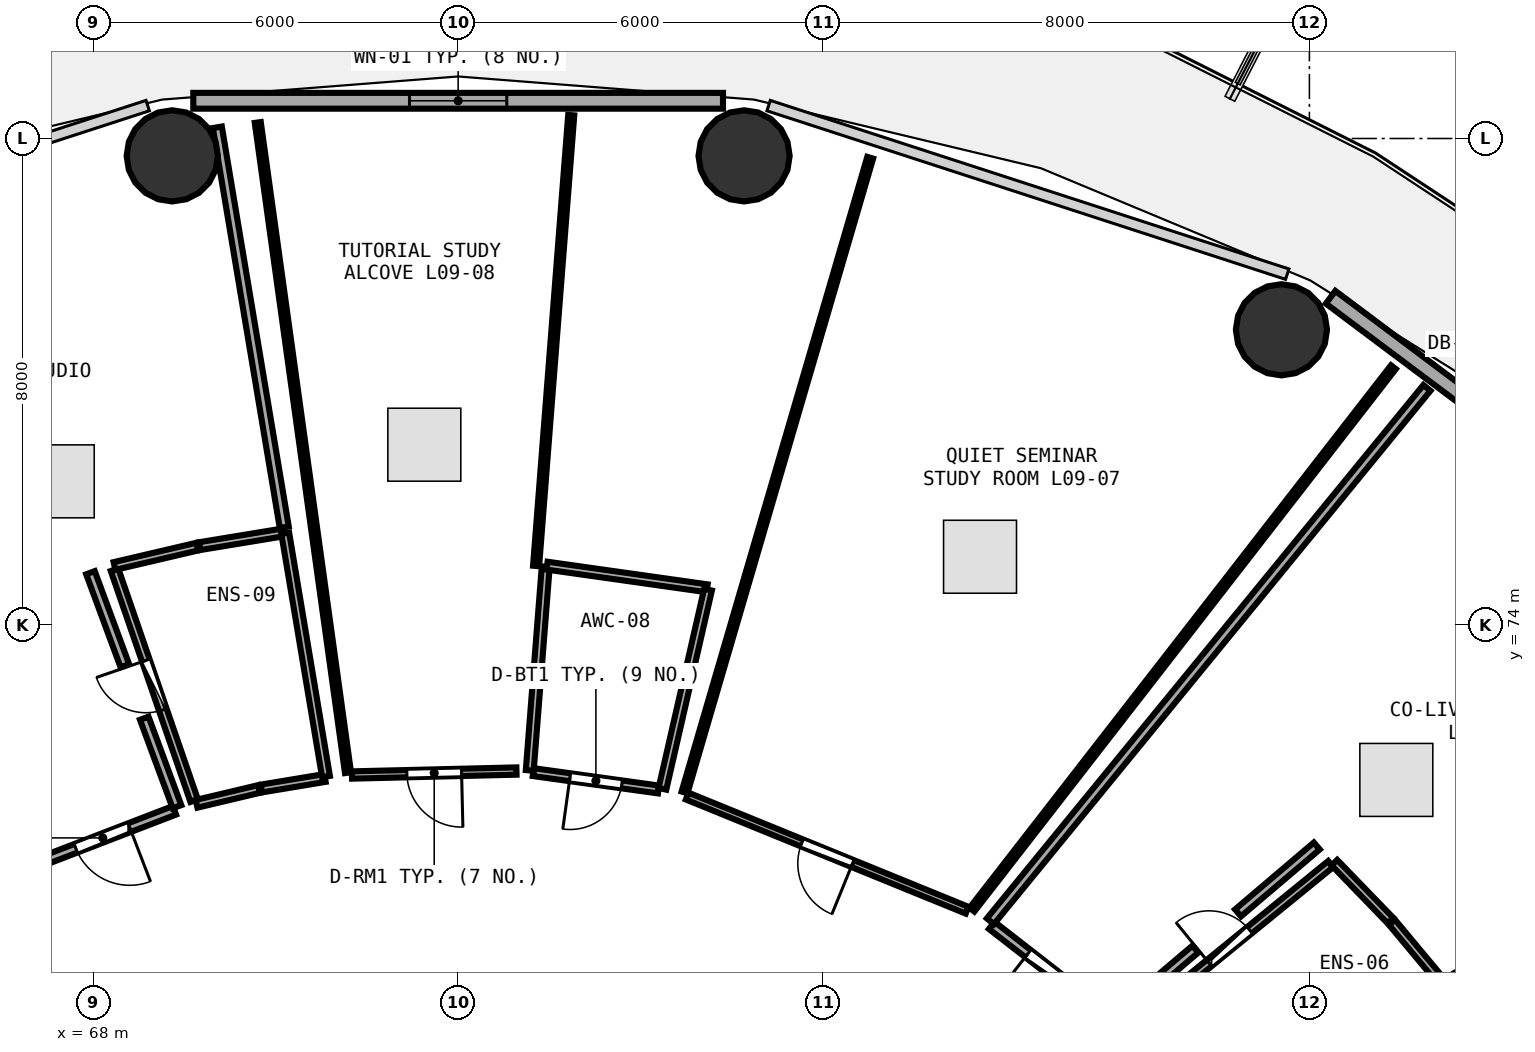
"""IFC4 building model, lengths in metres.
Left out: names, types, materials, properties, quantities, classifications, styles, units other than length and angle.
Written with IfcOpenShell. Run it as: python <this file> out.ifc"""

import sys

from ifc_helpers import new_model, si_unit, direction, frame, frame_2d, origin, origin_2d, place, context, subcontext, project, spatial, rectangle, circle, extrude, element, fill, save


model = new_model("IFC4")
c1 = context("Model", 3, precision=1e-05, world=origin(), true_north=direction((0.0, 1.0)))
c2 = subcontext(c1, "Body", "Model", "MODEL_VIEW")
j1 = project(units=[si_unit("LENGTHUNIT", "METRE"), si_unit("PLANEANGLEUNIT", "RADIAN")], contexts=[c1])
p1 = place(None, origin())
s1 = spatial("IfcSite", under=j1, at=p1, CompositionType="ELEMENT")
p2 = place(p1, origin())
s2 = spatial("IfcBuilding", under=s1, at=p2, CompositionType="ELEMENT")
p3 = place(p2, frame((0.0, 0.0, 37.5)))
s3 = spatial("IfcBuildingStorey", under=s2, at=p3, CompositionType="ELEMENT", Elevation=37.5)
for number, where, z_axis, x_axis in (
    (1, (87.54, 78.854, 0.0), (0.0, 0.0, 1.0), (1.0, 0.0, 0.0)),
    (2, (78.702, 81.714, 0.0), (0.0, 0.0, 1.0), (1.0, 0.0, 0.0)),
    (3, (69.298, 81.714, 0.0), (0.0, 0.0, 1.0), (1.0, 0.0, 0.0)),
):
    element("IfcColumn", number, at=place(p3, frame(where, z_axis=z_axis, x_axis=x_axis)), inside=s3, PredefinedType="COLUMN", context=c2, shape_type="SweptSolid", body=[
        extrude(circle(Radius=0.75, at=origin_2d()), origin(), (0.0, 0.0, 1.0), 3.75),
    ])
p4 = place(p3, frame((94.984, 74.418, 0.0), z_axis=(0.0, 0.0, 1.0), x_axis=(-0.80030733173, 0.599590005569, 0.0)))
e4 = element("IfcWall", 4, at=p4, inside=s3, PredefinedType="SOLIDWALL", context=c2, shape_type="SweptSolid", body=[
    extrude(rectangle(XDim=8.291, YDim=0.26, at=frame_2d((4.145, 0.0))), origin(), (0.0, 0.0, 1.0), 3.475),
])
p5 = place(p4, frame((3.67, 0.0, 0.0)))
e5 = element("IfcOpeningElement", 5, at=p5, cuts=e4, PredefinedType="OPENING", context=c2, shape_type="SweptSolid", body=[
    extrude(rectangle(XDim=0.95, YDim=2.1, at=frame_2d((0.475, 1.05))), frame((0.0, 0.14, 0.0), z_axis=(0.0, -1.0, 0.0), x_axis=(1.0, 0.0, 0.0)), (0.0, 0.0, 1.0), 0.28),
])
p6 = place(p4, frame((2.09, 0.0, 0.85)))
e6 = element("IfcOpeningElement", 6, at=p6, cuts=e4, PredefinedType="OPENING", context=c2, shape_type="SweptSolid", body=[
    extrude(rectangle(XDim=1.2, YDim=1.45, at=frame_2d((0.6, 0.725))), frame((0.0, 0.14, 0.0), z_axis=(0.0, -1.0, 0.0), x_axis=(1.0, 0.0, 0.0)), (0.0, 0.0, 1.0), 0.28),
])
p7 = place(p3, frame((78.356, 82.62, 0.0), z_axis=(0.0, 0.0, 1.0), x_axis=(-1.0, 0.0, 0.0)))
e7 = element("IfcWall", 7, at=p7, inside=s3, PredefinedType="SOLIDWALL", context=c2, shape_type="SweptSolid", body=[
    extrude(rectangle(XDim=8.712, YDim=0.26, at=frame_2d((4.356, 0.0))), origin(), (0.0, 0.0, 1.0), 3.475),
])
p8 = place(p7, frame((3.556, 0.0, 0.85)))
e8 = element("IfcOpeningElement", 8, at=p8, cuts=e7, PredefinedType="OPENING", context=c2, shape_type="SweptSolid", body=[
    extrude(rectangle(XDim=1.6, YDim=1.45, at=frame_2d((0.8, 0.725))), frame((0.0, 0.14, 0.0), z_axis=(0.0, -1.0, 0.0), x_axis=(1.0, 0.0, 0.0)), (0.0, 0.0, 1.0), 0.28),
])
p9 = place(p3, frame((85.019, 67.353, 0.0), z_axis=(0.0, 0.0, 1.0), x_axis=(0.775195837983, 0.631720992823, 0.0)))
e9 = element("IfcWall", 9, at=p9, inside=s3, PredefinedType="PLUMBINGWALL", context=c2, shape_type="SweptSolid", body=[
    extrude(rectangle(XDim=4.298, YDim=0.13, at=frame_2d((2.149, 0.0))), origin(), (0.0, 0.0, 1.0), 3.235),
])
p10 = place(p9, frame((1.719, 0.0, 0.0)))
e10 = element("IfcOpeningElement", 10, at=p10, cuts=e9, PredefinedType="OPENING", context=c2, shape_type="SweptSolid", body=[
    extrude(rectangle(XDim=0.86, YDim=2.05, at=frame_2d((0.43, 1.025))), frame((0.0, 0.075, 0.0), z_axis=(0.0, -1.0, 0.0), x_axis=(1.0, 0.0, 0.0)), (0.0, 0.0, 1.0), 0.15),
])
p11 = place(p3, frame((84.717, 67.55, 0.0), z_axis=(0.0, 0.0, 1.0), x_axis=(-0.78945378775, 0.613810000739, 0.0)))
e11 = element("IfcWall", 11, at=p11, inside=s3, PredefinedType="PARTITIONING", context=c2, shape_type="SweptSolid", body=[
    extrude(rectangle(XDim=2.459, YDim=0.15, at=frame_2d((1.229, 0.0))), origin(), (0.0, 0.0, 1.0), 2.875),
])
p12 = place(p11, frame((0.754, 0.0, 0.0)))
e12 = element("IfcOpeningElement", 12, at=p12, cuts=e11, PredefinedType="OPENING", context=c2, shape_type="SweptSolid", body=[
    extrude(rectangle(XDim=0.95, YDim=2.08, at=frame_2d((0.475, 1.04))), frame((0.0, 0.085, 0.0), z_axis=(0.0, -1.0, 0.0), x_axis=(1.0, 0.0, 0.0)), (0.0, 0.0, 1.0), 0.17),
])
p13 = place(p3, frame((82.37, 69.309, 0.0), z_axis=(0.0, 0.0, 1.0), x_axis=(-0.925986810505, 0.377555859139, 0.0)))
e13 = element("IfcWall", 13, at=p13, inside=s3, PredefinedType="PARTITIONING", context=c2, shape_type="SweptSolid", body=[
    extrude(rectangle(XDim=4.971, YDim=0.12, at=frame_2d((2.485, 0.0))), origin(), (0.0, 0.0, 1.0), 2.875),
])
p14 = place(p13, frame((2.035, 0.0, 0.0)))
e14 = element("IfcOpeningElement", 14, at=p14, cuts=e13, PredefinedType="OPENING", context=c2, shape_type="SweptSolid", body=[
    extrude(rectangle(XDim=0.9, YDim=2.08, at=frame_2d((0.45, 1.04))), frame((0.0, 0.07, 0.0), z_axis=(0.0, -1.0, 0.0), x_axis=(1.0, 0.0, 0.0)), (0.0, 0.0, 1.0), 0.14),
])
p15 = place(p3, frame((77.296, 71.294, 0.0), z_axis=(0.0, 0.0, 1.0), x_axis=(-0.990525563984, 0.137328464257, 0.0)))
e15 = element("IfcWall", 15, at=p15, inside=s3, PredefinedType="PLUMBINGWALL", context=c2, shape_type="SweptSolid", body=[
    extrude(rectangle(XDim=2.08, YDim=0.13, at=frame_2d((1.04, 0.0))), origin(), (0.0, 0.0, 1.0), 3.235),
])
p16 = place(p15, frame((0.61, 0.0, 0.0)))
e16 = element("IfcOpeningElement", 16, at=p16, cuts=e15, PredefinedType="OPENING", context=c2, shape_type="SweptSolid", body=[
    extrude(rectangle(XDim=0.86, YDim=2.05, at=frame_2d((0.43, 1.025))), frame((0.0, 0.075, 0.0), z_axis=(0.0, -1.0, 0.0), x_axis=(1.0, 0.0, 0.0)), (0.0, 0.0, 1.0), 0.15),
])
p17 = place(p3, frame((74.959, 71.598, 0.0), z_axis=(0.0, 0.0, 1.0), x_axis=(-0.999709782288, -0.024090479411, 0.0)))
e17 = element("IfcWall", 17, at=p17, inside=s3, PredefinedType="PARTITIONING", context=c2, shape_type="SweptSolid", body=[
    extrude(rectangle(XDim=2.706, YDim=0.12, at=frame_2d((1.353, 0.0))), origin(), (0.0, 0.0, 1.0), 3.48),
])
p18 = place(p17, frame((0.903, 0.0, 0.0)))
e18 = element("IfcOpeningElement", 18, at=p18, cuts=e17, PredefinedType="OPENING", context=c2, shape_type="SweptSolid", body=[
    extrude(rectangle(XDim=0.9, YDim=2.08, at=frame_2d((0.45, 1.04))), frame((0.0, 0.07, 0.0), z_axis=(0.0, -1.0, 0.0), x_axis=(1.0, 0.0, 0.0)), (0.0, 0.0, 1.0), 0.14),
])
p19 = place(p3, frame((69.658, 71.111, 0.0), z_axis=(0.0, 0.0, 1.0), x_axis=(-0.326056236537, 0.945350374525, 0.0)))
e19 = element("IfcWall", 19, at=p19, inside=s3, PredefinedType="PLUMBINGWALL", context=c2, shape_type="SweptSolid", body=[
    extrude(rectangle(XDim=4.017, YDim=0.13, at=frame_2d((2.009, 0.0))), origin(), (0.0, 0.0, 1.0), 3.175),
])
p20 = place(p19, frame((1.579, 0.0, 0.0)))
e20 = element("IfcOpeningElement", 20, at=p20, cuts=e19, PredefinedType="OPENING", context=c2, shape_type="SweptSolid", body=[
    extrude(rectangle(XDim=0.86, YDim=2.05, at=frame_2d((0.43, 1.025))), frame((0.0, 0.075, 0.0), z_axis=(0.0, -1.0, 0.0), x_axis=(1.0, 0.0, 0.0)), (0.0, 0.0, 1.0), 0.15),
])
p21 = place(p3, frame((69.334, 70.951, 0.0), z_axis=(0.0, 0.0, 1.0), x_axis=(-0.933283302704, -0.35914102647, 0.0)))
e21 = element("IfcWall", 21, at=p21, inside=s3, PredefinedType="PARTITIONING", context=c2, shape_type="SweptSolid", body=[
    extrude(rectangle(XDim=2.525, YDim=0.15, at=frame_2d((1.263, 0.0))), origin(), (0.0, 0.0, 1.0), 3.48),
])
p22 = place(p21, frame((0.788, 0.0, 0.0)))
e22 = element("IfcOpeningElement", 22, at=p22, cuts=e21, PredefinedType="OPENING", context=c2, shape_type="SweptSolid", body=[
    extrude(rectangle(XDim=0.95, YDim=2.08, at=frame_2d((0.475, 1.04))), frame((0.0, 0.085, 0.0), z_axis=(0.0, -1.0, 0.0), x_axis=(1.0, 0.0, 0.0)), (0.0, 0.0, 1.0), 0.17),
])
p23 = place(p3, frame((86.597, 65.503, 0.0), z_axis=(0.0, 0.0, 1.0), x_axis=(0.867860677455, 0.496807653451, 0.0)))
e23 = element("IfcWall", 23, at=p23, inside=s3, PredefinedType="PARTITIONING", context=c2, shape_type="SweptSolid", body=[
    extrude(rectangle(XDim=11.91, YDim=0.1, at=frame_2d((5.955, 0.0))), origin(), (0.0, 0.0, 1.0), 2.875),
])
p24 = place(p3, frame((88.411, 70.092, 0.0), z_axis=(0.0, 0.0, 1.0), x_axis=(0.695307837391, -0.718712050311, 0.0)))
e24 = element("IfcWall", 24, at=p24, inside=s3, PredefinedType="PLUMBINGWALL", context=c2, shape_type="SweptSolid", body=[
    extrude(rectangle(XDim=1.325, YDim=0.13, at=frame_2d((0.662, 0.0))), origin(), (0.0, 0.0, 1.0), 2.875),
])
p25 = place(p3, frame((89.359, 69.11, 0.0), z_axis=(0.0, 0.0, 1.0), x_axis=(0.640366952349, -0.7680691156, 0.0)))
e25 = element("IfcWall", 25, at=p25, inside=s3, PredefinedType="PLUMBINGWALL", context=c2, shape_type="SweptSolid", body=[
    extrude(rectangle(XDim=1.315, YDim=0.13, at=frame_2d((0.658, 0.0))), origin(), (0.0, 0.0, 1.0), 3.48),
])
p26 = place(p3, frame((82.753, 69.127, 0.0), z_axis=(0.0, 0.0, 1.0), x_axis=(0.633350378952, 0.773865167508, 0.0)))
e26 = element("IfcWall", 26, at=p26, inside=s3, PredefinedType="PARTITIONING", context=c2, shape_type="SweptSolid", body=[
    extrude(rectangle(XDim=11.335, YDim=0.15, at=frame_2d((5.667, 0.0))), origin(), (0.0, 0.0, 1.0), 2.875),
])
p27 = place(p3, frame((96.559, 71.915, 0.0), z_axis=(0.0, 0.0, 1.0), x_axis=(-0.856200610964, -0.516643507444, 0.0)))
e27 = element("IfcWall", 27, at=p27, inside=s3, PredefinedType="PARTITIONING", context=c2, shape_type="SweptSolid", body=[
    extrude(rectangle(XDim=7.333, YDim=0.15, at=frame_2d((3.667, 0.0))), origin(), (0.0, 0.0, 1.0), 2.875),
])
p28 = place(p3, frame((88.122, 70.365, 0.0), z_axis=(0.0, 0.0, 1.0), x_axis=(-0.762159009155, -0.647389870761, 0.0)))
e28 = element("IfcWall", 28, at=p28, inside=s3, PredefinedType="PARTITIONING", context=c2, shape_type="SweptSolid", body=[
    extrude(rectangle(XDim=1.7, YDim=0.15, at=frame_2d((0.85, 0.0))), origin(), (0.0, 0.0, 1.0), 3.48),
])
p29 = place(p3, frame((86.125, 68.669, 0.0), z_axis=(0.0, 0.0, 1.0), x_axis=(-0.762122187233, -0.647433217967, 0.0)))
e29 = element("IfcWall", 29, at=p29, inside=s3, PredefinedType="PARTITIONING", context=c2, shape_type="SweptSolid", body=[
    extrude(rectangle(XDim=1.746, YDim=0.15, at=frame_2d((0.873, 0.0))), origin(), (0.0, 0.0, 1.0), 3.235),
])
p30 = place(p3, frame((77.723, 71.246, 0.0), z_axis=(0.0, 0.0, 1.0), x_axis=(0.280805949977, 0.959764564077, 0.0)))
e30 = element("IfcWall", 30, at=p30, inside=s3, PredefinedType="PARTITIONING", context=c2, shape_type="SweptSolid", body=[
    extrude(rectangle(XDim=10.875, YDim=0.1, at=frame_2d((5.438, 0.0))), origin(), (0.0, 0.0, 1.0), 2.875),
])
p31 = place(p3, frame((89.382, 78.24, 0.0), z_axis=(0.0, 0.0, 1.0), x_axis=(-0.613494694267, -0.789698841398, 0.0)))
e31 = element("IfcWall", 31, at=p31, inside=s3, PredefinedType="PARTITIONING", context=c2, shape_type="SweptSolid", body=[
    extrude(rectangle(XDim=11.298, YDim=0.1, at=frame_2d((5.649, 0.0))), origin(), (0.0, 0.0, 1.0), 2.875),
])
p32 = place(p3, frame((75.177, 71.608, 0.0), z_axis=(0.0, 0.0, 1.0), x_axis=(0.078246463122, 0.996934045466, 0.0)))
e32 = element("IfcWall", 32, at=p32, inside=s3, PredefinedType="PLUMBINGWALL", context=c2, shape_type="SweptSolid", body=[
    extrude(rectangle(XDim=3.36, YDim=0.13, at=frame_2d((1.68, 0.0))), origin(), (0.0, 0.0, 1.0), 3.175),
])
p33 = place(p3, frame((75.462, 74.975, 0.0), z_axis=(0.0, 0.0, 1.0), x_axis=(0.990145060781, -0.140045559051, 0.0)))
e33 = element("IfcWall", 33, at=p33, inside=s3, PredefinedType="PLUMBINGWALL", context=c2, shape_type="SweptSolid", body=[
    extrude(rectangle(XDim=2.658, YDim=0.13, at=frame_2d((1.329, 0.0))), origin(), (0.0, 0.0, 1.0), 3.175),
])
p34 = place(p3, frame((78.11, 74.581, 0.0), z_axis=(0.0, 0.0, 1.0), x_axis=(-0.223219382096, -0.974768232688, 0.0)))
e34 = element("IfcWall", 34, at=p34, inside=s3, PredefinedType="PLUMBINGWALL", context=c2, shape_type="SweptSolid", body=[
    extrude(rectangle(XDim=3.36, YDim=0.13, at=frame_2d((1.68, 0.0))), origin(), (0.0, 0.0, 1.0), 3.235),
])
p35 = place(p3, frame((72.188, 71.571, 0.0), z_axis=(0.0, 0.0, 1.0), x_axis=(-0.137456200911, 0.990507845921, 0.0)))
e35 = element("IfcWall", 35, at=p35, inside=s3, PredefinedType="PARTITIONING", context=c2, shape_type="SweptSolid", body=[
    extrude(rectangle(XDim=10.795, YDim=0.1, at=frame_2d((5.398, 0.0))), origin(), (0.0, 0.0, 1.0), 2.875),
])
p36 = place(p3, frame((75.86, 82.384, 0.0), z_axis=(0.0, 0.0, 1.0), x_axis=(-0.077713284576, -0.996975749655, 0.0)))
e36 = element("IfcWall", 36, at=p36, inside=s3, PredefinedType="PARTITIONING", context=c2, shape_type="SweptSolid", body=[
    extrude(rectangle(XDim=7.436, YDim=0.1, at=frame_2d((3.718, 0.0))), origin(), (0.0, 0.0, 1.0), 2.875),
])
p37 = place(p3, frame((71.81, 71.484, 0.0), z_axis=(0.0, 0.0, 1.0), x_axis=(-0.986536732665, -0.163539827269, 0.0)))
e37 = element("IfcWall", 37, at=p37, inside=s3, PredefinedType="PLUMBINGWALL", context=c2, shape_type="SweptSolid", body=[
    extrude(rectangle(XDim=1.06, YDim=0.13, at=frame_2d((0.53, 0.0))), origin(), (0.0, 0.0, 1.0), 2.875),
])
p38 = place(p3, frame((70.726, 71.302, 0.0), z_axis=(0.0, 0.0, 1.0), x_axis=(-0.972994310962, -0.230829094431, 0.0)))
e38 = element("IfcWall", 38, at=p38, inside=s3, PredefinedType="PLUMBINGWALL", context=c2, shape_type="SweptSolid", body=[
    extrude(rectangle(XDim=1.057, YDim=0.13, at=frame_2d((0.528, 0.0))), origin(), (0.0, 0.0, 1.0), 2.875),
])
p39 = place(p3, frame((68.348, 74.969, 0.0), z_axis=(0.0, 0.0, 1.0), x_axis=(0.973677466502, 0.227930233241, 0.0)))
e39 = element("IfcWall", 39, at=p39, inside=s3, PredefinedType="PLUMBINGWALL", context=c2, shape_type="SweptSolid", body=[
    extrude(rectangle(XDim=1.399, YDim=0.13, at=frame_2d((0.699, 0.0))), origin(), (0.0, 0.0, 1.0), 3.48),
])
p40 = place(p3, frame((69.75, 75.296, 0.0), z_axis=(0.0, 0.0, 1.0), x_axis=(0.986744598887, 0.162280918681, 0.0)))
e40 = element("IfcWall", 40, at=p40, inside=s3, PredefinedType="PLUMBINGWALL", context=c2, shape_type="SweptSolid", body=[
    extrude(rectangle(XDim=1.402, YDim=0.13, at=frame_2d((0.701, 0.0))), origin(), (0.0, 0.0, 1.0), 2.875),
])
p41 = place(p3, frame((71.156, 75.507, 0.0), z_axis=(0.0, 0.0, 1.0), x_axis=(0.165267537024, -0.986248772474, 0.0)))
e41 = element("IfcWall", 41, at=p41, inside=s3, PredefinedType="PLUMBINGWALL", context=c2, shape_type="SweptSolid", body=[
    extrude(rectangle(XDim=4.056, YDim=0.13, at=frame_2d((2.028, 0.0))), origin(), (0.0, 0.0, 1.0), 3.175),
])
p42 = place(p3, frame((70.04, 82.185, 0.0), z_axis=(0.0, 0.0, 1.0), x_axis=(0.165051905183, -0.986284882068, 0.0)))
e42 = element("IfcWall", 42, at=p42, inside=s3, PredefinedType="PARTITIONING", context=c2, shape_type="SweptSolid", body=[
    extrude(rectangle(XDim=6.67, YDim=0.15, at=frame_2d((3.335, 0.0))), origin(), (0.0, 0.0, 1.0), 2.875),
])
p43 = place(p3, frame((67.953, 74.86, 0.0), z_axis=(0.0, 0.0, 1.0), x_axis=(0.346856200849, -0.937918320502, 0.0)))
e43 = element("IfcWall", 43, at=p43, inside=s3, PredefinedType="PARTITIONING", context=c2, shape_type="SweptSolid", body=[
    extrude(rectangle(XDim=1.632, YDim=0.15, at=frame_2d((0.816, 0.0))), origin(), (0.0, 0.0, 1.0), 3.175),
])
p44 = place(p3, frame((68.838, 72.466, 0.0), z_axis=(0.0, 0.0, 1.0), x_axis=(0.346827635281, -0.937928883981, 0.0)))
e44 = element("IfcWall", 44, at=p44, inside=s3, PredefinedType="PARTITIONING", context=c2, shape_type="SweptSolid", body=[
    extrude(rectangle(XDim=1.552, YDim=0.15, at=frame_2d((0.776, 0.0))), origin(), (0.0, 0.0, 1.0), 3.235),
])
p45 = place(p8, origin())
e45 = element("IfcWindow", 45, at=p45, inside=s3, PartitioningType="SINGLE_PANEL", PredefinedType="WINDOW", context=c2, shape_type="SweptSolid", body=[
    extrude(rectangle(XDim=1.6, YDim=1.45, at=frame_2d((0.8, 0.725))), frame((0.0, 0.03, 0.0), z_axis=(0.0, -1.0, 0.0), x_axis=(1.0, 0.0, 0.0)), (0.0, 0.0, 1.0), 0.06),
])
fill(e8, e45)
p46 = place(p10, origin())
e46 = element("IfcDoor", 46, at=p46, inside=s3, OperationType="SINGLE_SWING_LEFT", PredefinedType="DOOR", context=c2, shape_type="SweptSolid", body=[
    extrude(rectangle(XDim=0.86, YDim=2.05, at=frame_2d((0.43, 1.025))), frame((0.0, 0.025, 0.0), z_axis=(0.0, -1.0, 0.0), x_axis=(1.0, 0.0, 0.0)), (0.0, 0.0, 1.0), 0.05),
])
fill(e10, e46)
p47 = place(p12, origin())
e47 = element("IfcDoor", 47, at=p47, inside=s3, OperationType="SINGLE_SWING_RIGHT", PredefinedType="DOOR", context=c2, shape_type="SweptSolid", body=[
    extrude(rectangle(XDim=0.95, YDim=2.08, at=frame_2d((0.475, 1.04))), frame((0.0, 0.025, 0.0), z_axis=(0.0, -1.0, 0.0), x_axis=(1.0, 0.0, 0.0)), (0.0, 0.0, 1.0), 0.05),
])
fill(e12, e47)
p48 = place(p14, origin())
e48 = element("IfcDoor", 48, at=p48, inside=s3, OperationType="SINGLE_SWING_LEFT", PredefinedType="DOOR", context=c2, shape_type="SweptSolid", body=[
    extrude(rectangle(XDim=0.9, YDim=2.08, at=frame_2d((0.45, 1.04))), frame((0.0, 0.025, 0.0), z_axis=(0.0, -1.0, 0.0), x_axis=(1.0, 0.0, 0.0)), (0.0, 0.0, 1.0), 0.05),
])
fill(e14, e48)
p49 = place(p16, origin())
e49 = element("IfcDoor", 49, at=p49, inside=s3, OperationType="SINGLE_SWING_RIGHT", PredefinedType="DOOR", context=c2, shape_type="SweptSolid", body=[
    extrude(rectangle(XDim=0.86, YDim=2.05, at=frame_2d((0.43, 1.025))), frame((0.0, 0.025, 0.0), z_axis=(0.0, -1.0, 0.0), x_axis=(1.0, 0.0, 0.0)), (0.0, 0.0, 1.0), 0.05),
])
fill(e16, e49)
p50 = place(p18, origin())
e50 = element("IfcDoor", 50, at=p50, inside=s3, OperationType="SINGLE_SWING_LEFT", PredefinedType="DOOR", context=c2, shape_type="SweptSolid", body=[
    extrude(rectangle(XDim=0.9, YDim=2.08, at=frame_2d((0.45, 1.04))), frame((0.0, 0.025, 0.0), z_axis=(0.0, -1.0, 0.0), x_axis=(1.0, 0.0, 0.0)), (0.0, 0.0, 1.0), 0.05),
])
fill(e18, e50)
p51 = place(p20, origin())
e51 = element("IfcDoor", 51, at=p51, inside=s3, OperationType="SINGLE_SWING_RIGHT", PredefinedType="DOOR", context=c2, shape_type="SweptSolid", body=[
    extrude(rectangle(XDim=0.86, YDim=2.05, at=frame_2d((0.43, 1.025))), frame((0.0, 0.025, 0.0), z_axis=(0.0, -1.0, 0.0), x_axis=(1.0, 0.0, 0.0)), (0.0, 0.0, 1.0), 0.05),
])
fill(e20, e51)
p52 = place(p22, origin())
e52 = element("IfcDoor", 52, at=p52, inside=s3, OperationType="SINGLE_SWING_LEFT", PredefinedType="DOOR", context=c2, shape_type="SweptSolid", body=[
    extrude(rectangle(XDim=0.95, YDim=2.08, at=frame_2d((0.475, 1.04))), frame((0.0, 0.025, 0.0), z_axis=(0.0, -1.0, 0.0), x_axis=(1.0, 0.0, 0.0)), (0.0, 0.0, 1.0), 0.05),
])
fill(e22, e52)
save(model, sys.argv[1])
